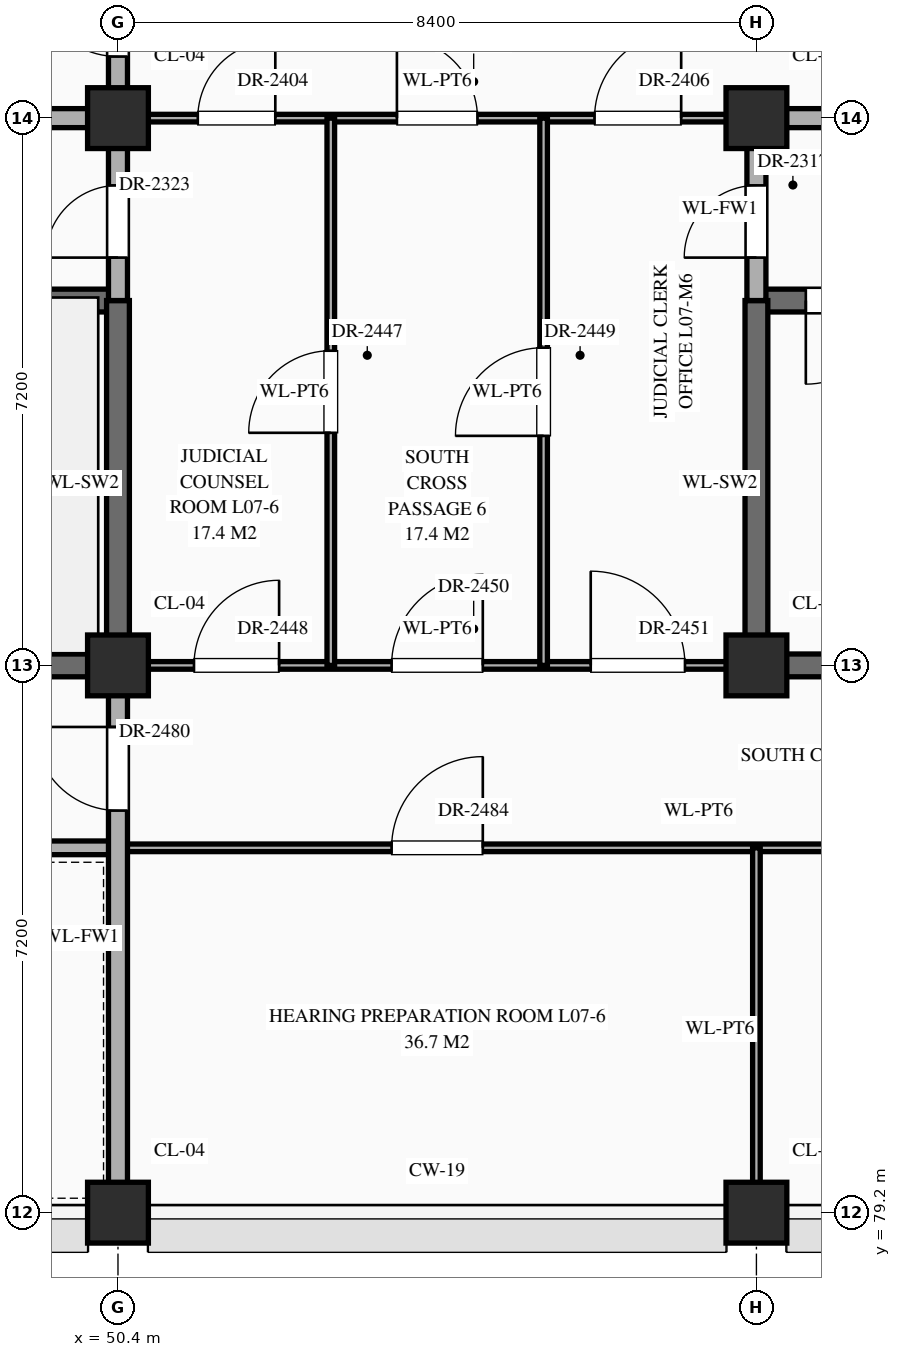
"""IFC4 building model, lengths in metres.
Left out: names, types, materials, properties, quantities, classifications, styles, units other than length and angle.
Written with IfcOpenShell. Run it as: python <this file> out.ifc"""

import sys

from ifc_helpers import new_model, si_unit, direction, frame, frame_2d, origin, origin_2d, place, context, subcontext, project, spatial, rectangle, extrude, element, fill, save


model = new_model("IFC4")
c1 = context("Model", 3, precision=1e-05, world=origin(), true_north=direction((0.0, 1.0)))
c2 = subcontext(c1, "Body", "Model", "MODEL_VIEW")
j1 = project(units=[si_unit("LENGTHUNIT", "METRE"), si_unit("PLANEANGLEUNIT", "RADIAN")], contexts=[c1])
p1 = place(None, origin())
s1 = spatial("IfcSite", under=j1, at=p1, CompositionType="ELEMENT")
p2 = place(p1, origin())
s2 = spatial("IfcBuilding", under=s1, at=p2, CompositionType="ELEMENT")
p3 = place(p2, frame((0.0, 0.0, 30.6)))
s3 = spatial("IfcBuildingStorey", under=s2, at=p3, CompositionType="ELEMENT", Elevation=30.6)
for number, where, z_axis, x_axis in (
    (1, (50.4, 79.2, 0.0), (0.0, 0.0, 1.0), (1.0, 0.0, 0.0)),
    (2, (50.4, 86.4, 0.0), (0.0, 0.0, 1.0), (1.0, 0.0, 0.0)),
    (3, (50.4, 93.6, 0.0), (0.0, 0.0, 1.0), (1.0, 0.0, 0.0)),
    (4, (58.8, 79.2, 0.0), (0.0, 0.0, 1.0), (1.0, 0.0, 0.0)),
    (5, (58.8, 86.4, 0.0), (0.0, 0.0, 1.0), (1.0, 0.0, 0.0)),
    (6, (58.8, 93.6, 0.0), (0.0, 0.0, 1.0), (1.0, 0.0, 0.0)),
):
    element("IfcColumn", number, at=place(p3, frame(where, z_axis=z_axis, x_axis=x_axis)), inside=s3, PredefinedType="COLUMN", context=c2, shape_type="SweptSolid", body=[
        extrude(rectangle(XDim=0.8, YDim=0.8, at=origin_2d()), origin(), (0.0, 0.0, 1.0), 4.5),
    ])
p4 = place(p3, frame((33.6, 84.0, 0.0), z_axis=(0.0, 0.0, 1.0), x_axis=(1.0, 0.0, 0.0)))
e7 = element("IfcWall", 7, at=p4, inside=s3, PredefinedType="STANDARD", context=c2, shape_type="SweptSolid", body=[
    extrude(rectangle(XDim=16.8, YDim=0.18, at=frame_2d((8.4, 0.0))), origin(), (0.0, 0.0, 1.0), 4.15),
])
p5 = place(p4, frame((7.45, 0.0, 0.0)))
e8 = element("IfcOpeningElement", 8, at=p5, cuts=e7, PredefinedType="OPENING", context=c2, shape_type="SweptSolid", body=[
    extrude(rectangle(XDim=1.9, YDim=2.5, at=frame_2d((0.95, 1.25))), frame((0.0, 0.102, 0.0), z_axis=(0.0, -1.0, 0.0), x_axis=(1.0, 0.0, 0.0)), (0.0, 0.0, 1.0), 0.204),
])
p6 = place(p3, frame((50.4, 84.0, 0.0), z_axis=(0.0, 0.0, 1.0), x_axis=(1.0, 0.0, 0.0)))
e9 = element("IfcWall", 9, at=p6, inside=s3, PredefinedType="STANDARD", context=c2, shape_type="SweptSolid", body=[
    extrude(rectangle(XDim=16.8, YDim=0.1, at=frame_2d((8.4, 0.0))), origin(), (0.0, 0.0, 1.0), 4.24),
])
p7 = place(p6, frame((3.6, 0.0, 0.0)))
e10 = element("IfcOpeningElement", 10, at=p7, cuts=e9, PredefinedType="OPENING", context=c2, shape_type="SweptSolid", body=[
    extrude(rectangle(XDim=1.2, YDim=2.35, at=frame_2d((0.6, 1.175))), frame((0.0, 0.062, 0.0), z_axis=(0.0, -1.0, 0.0), x_axis=(1.0, 0.0, 0.0)), (0.0, 0.0, 1.0), 0.124),
])
p8 = place(p6, frame((11.98, 0.0, 0.0)))
e11 = element("IfcOpeningElement", 11, at=p8, cuts=e9, PredefinedType="OPENING", context=c2, shape_type="SweptSolid", body=[
    extrude(rectangle(XDim=1.24, YDim=2.3, at=frame_2d((0.62, 1.15))), frame((0.0, 0.062, 0.0), z_axis=(0.0, -1.0, 0.0), x_axis=(1.0, 0.0, 0.0)), (0.0, 0.0, 1.0), 0.124),
])
p9 = place(p3, frame((42.0, 86.4, 0.0), z_axis=(0.0, 0.0, 1.0), x_axis=(1.0, 0.0, 0.0)))
e12 = element("IfcWall", 12, at=p9, inside=s3, PredefinedType="SHEAR", context=c2, shape_type="SweptSolid", body=[
    extrude(rectangle(XDim=8.4, YDim=0.3, at=frame_2d((4.2, 0.0))), origin(), (0.0, 0.0, 1.0), 4.24),
])
p10 = place(p3, frame((50.4, 86.4, 0.0), z_axis=(0.0, 0.0, 1.0), x_axis=(1.0, 0.0, 0.0)))
e13 = element("IfcWall", 13, at=p10, inside=s3, PredefinedType="STANDARD", context=c2, shape_type="SweptSolid", body=[
    extrude(rectangle(XDim=8.4, YDim=0.1, at=frame_2d((4.2, 0.0))), origin(), (0.0, 0.0, 1.0), 3.39),
])
p11 = place(p10, frame((1.0, 0.0, 0.0)))
e14 = element("IfcOpeningElement", 14, at=p11, cuts=e13, PredefinedType="OPENING", context=c2, shape_type="SweptSolid", body=[
    extrude(rectangle(XDim=1.12, YDim=2.25, at=frame_2d((0.56, 1.125))), frame((0.0, 0.062, 0.0), z_axis=(0.0, -1.0, 0.0), x_axis=(1.0, 0.0, 0.0)), (0.0, 0.0, 1.0), 0.124),
])
p12 = place(p10, frame((3.6, 0.0, 0.0)))
e15 = element("IfcOpeningElement", 15, at=p12, cuts=e13, PredefinedType="OPENING", context=c2, shape_type="SweptSolid", body=[
    extrude(rectangle(XDim=1.2, YDim=2.35, at=frame_2d((0.6, 1.175))), frame((0.0, 0.062, 0.0), z_axis=(0.0, -1.0, 0.0), x_axis=(1.0, 0.0, 0.0)), (0.0, 0.0, 1.0), 0.124),
])
p13 = place(p10, frame((6.22, 0.0, 0.0)))
e16 = element("IfcOpeningElement", 16, at=p13, cuts=e13, PredefinedType="OPENING", context=c2, shape_type="SweptSolid", body=[
    extrude(rectangle(XDim=1.24, YDim=2.3, at=frame_2d((0.62, 1.15))), frame((0.0, 0.062, 0.0), z_axis=(0.0, -1.0, 0.0), x_axis=(1.0, 0.0, 0.0)), (0.0, 0.0, 1.0), 0.124),
])
p14 = place(p3, frame((58.8, 86.4, 0.0), z_axis=(0.0, 0.0, 1.0), x_axis=(1.0, 0.0, 0.0)))
e17 = element("IfcWall", 17, at=p14, inside=s3, PredefinedType="SHEAR", context=c2, shape_type="SweptSolid", body=[
    extrude(rectangle(XDim=8.4, YDim=0.3, at=frame_2d((4.2, 0.0))), origin(), (0.0, 0.0, 1.0), 4.24),
])
p15 = place(p3, frame((42.0, 91.2, 0.0), z_axis=(0.0, 0.0, 1.0), x_axis=(1.0, 0.0, 0.0)))
e18 = element("IfcWall", 18, at=p15, inside=s3, PredefinedType="SHEAR", context=c2, shape_type="SweptSolid", body=[
    extrude(rectangle(XDim=8.4, YDim=0.3, at=frame_2d((4.2, 0.0))), origin(), (0.0, 0.0, 1.0), 4.24),
])
p16 = place(p15, frame((0.65, 0.0, 0.0)))
e19 = element("IfcOpeningElement", 19, at=p16, cuts=e18, PredefinedType="OPENING", context=c2, shape_type="SweptSolid", body=[
    extrude(rectangle(XDim=1.1, YDim=2.2, at=frame_2d((0.55, 1.1))), frame((0.0, 0.162, 0.0), z_axis=(0.0, -1.0, 0.0), x_axis=(1.0, 0.0, 0.0)), (0.0, 0.0, 1.0), 0.324),
])
p17 = place(p3, frame((58.8, 91.2, 0.0), z_axis=(0.0, 0.0, 1.0), x_axis=(1.0, 0.0, 0.0)))
e20 = element("IfcWall", 20, at=p17, inside=s3, PredefinedType="SHEAR", context=c2, shape_type="SweptSolid", body=[
    extrude(rectangle(XDim=8.4, YDim=0.3, at=frame_2d((4.2, 0.0))), origin(), (0.0, 0.0, 1.0), 4.24),
])
p18 = place(p17, frame((0.65, 0.0, 0.0)))
e21 = element("IfcOpeningElement", 21, at=p18, cuts=e20, PredefinedType="OPENING", context=c2, shape_type="SweptSolid", body=[
    extrude(rectangle(XDim=1.1, YDim=2.2, at=frame_2d((0.55, 1.1))), frame((0.0, 0.162, 0.0), z_axis=(0.0, -1.0, 0.0), x_axis=(1.0, 0.0, 0.0)), (0.0, 0.0, 1.0), 0.324),
])
p19 = place(p3, frame((42.0, 93.6, 0.0), z_axis=(0.0, 0.0, 1.0), x_axis=(1.0, 0.0, 0.0)))
e22 = element("IfcWall", 22, at=p19, inside=s3, PredefinedType="STANDARD", context=c2, shape_type="SweptSolid", body=[
    extrude(rectangle(XDim=8.4, YDim=0.25, at=frame_2d((4.2, 0.0))), origin(), (0.0, 0.0, 1.0), 3.39),
])
p20 = place(p19, frame((3.4, 0.0, 0.0)))
e23 = element("IfcOpeningElement", 23, at=p20, cuts=e22, PredefinedType="OPENING", context=c2, shape_type="SweptSolid", body=[
    extrude(rectangle(XDim=1.6, YDim=2.3, at=frame_2d((0.8, 1.15))), frame((0.0, 0.137, 0.0), z_axis=(0.0, -1.0, 0.0), x_axis=(1.0, 0.0, 0.0)), (0.0, 0.0, 1.0), 0.274),
])
p21 = place(p3, frame((50.4, 93.6, 0.0), z_axis=(0.0, 0.0, 1.0), x_axis=(1.0, 0.0, 0.0)))
e24 = element("IfcWall", 24, at=p21, inside=s3, PredefinedType="STANDARD", context=c2, shape_type="SweptSolid", body=[
    extrude(rectangle(XDim=8.4, YDim=0.1, at=frame_2d((4.2, 0.0))), origin(), (0.0, 0.0, 1.0), 3.39),
])
p22 = place(p21, frame((1.05, 0.0, 0.0)))
e25 = element("IfcOpeningElement", 25, at=p22, cuts=e24, PredefinedType="OPENING", context=c2, shape_type="SweptSolid", body=[
    extrude(rectangle(XDim=1.02, YDim=2.4, at=frame_2d((0.51, 1.2))), frame((0.0, 0.062, 0.0), z_axis=(0.0, -1.0, 0.0), x_axis=(1.0, 0.0, 0.0)), (0.0, 0.0, 1.0), 0.124),
])
p23 = place(p21, frame((3.67, 0.0, 0.0)))
e26 = element("IfcOpeningElement", 26, at=p23, cuts=e24, PredefinedType="OPENING", context=c2, shape_type="SweptSolid", body=[
    extrude(rectangle(XDim=1.06, YDim=2.4, at=frame_2d((0.53, 1.2))), frame((0.0, 0.062, 0.0), z_axis=(0.0, -1.0, 0.0), x_axis=(1.0, 0.0, 0.0)), (0.0, 0.0, 1.0), 0.124),
])
p24 = place(p21, frame((6.27, 0.0, 0.0)))
e27 = element("IfcOpeningElement", 27, at=p24, cuts=e24, PredefinedType="OPENING", context=c2, shape_type="SweptSolid", body=[
    extrude(rectangle(XDim=1.14, YDim=2.4, at=frame_2d((0.57, 1.2))), frame((0.0, 0.062, 0.0), z_axis=(0.0, -1.0, 0.0), x_axis=(1.0, 0.0, 0.0)), (0.0, 0.0, 1.0), 0.124),
])
p25 = place(p3, frame((58.8, 93.6, 0.0), z_axis=(0.0, 0.0, 1.0), x_axis=(1.0, 0.0, 0.0)))
e28 = element("IfcWall", 28, at=p25, inside=s3, PredefinedType="STANDARD", context=c2, shape_type="SweptSolid", body=[
    extrude(rectangle(XDim=8.4, YDim=0.25, at=frame_2d((4.2, 0.0))), origin(), (0.0, 0.0, 1.0), 3.39),
])
p26 = place(p25, frame((3.2, 0.0, 0.0)))
e29 = element("IfcOpeningElement", 29, at=p26, cuts=e28, PredefinedType="OPENING", context=c2, shape_type="SweptSolid", body=[
    extrude(rectangle(XDim=2.0, YDim=2.4, at=frame_2d((1.0, 1.2))), frame((0.0, 0.137, 0.0), z_axis=(0.0, -1.0, 0.0), x_axis=(1.0, 0.0, 0.0)), (0.0, 0.0, 1.0), 0.274),
])
p27 = place(p3, frame((50.4, 79.24, 0.0), z_axis=(0.0, 0.0, 1.0), x_axis=(0.0, 1.0, 0.0)))
e30 = element("IfcWall", 30, at=p27, inside=s3, PredefinedType="STANDARD", context=c2, shape_type="SweptSolid", body=[
    extrude(rectangle(XDim=7.16, YDim=0.25, at=frame_2d((3.58, 0.0))), origin(), (0.0, 0.0, 1.0), 3.49),
])
p28 = place(p27, frame((5.25, 0.0, 0.0)))
e31 = element("IfcOpeningElement", 31, at=p28, cuts=e30, PredefinedType="OPENING", context=c2, shape_type="SweptSolid", body=[
    extrude(rectangle(XDim=1.1, YDim=2.2, at=frame_2d((0.55, 1.1))), frame((0.0, 0.137, 0.0), z_axis=(0.0, -1.0, 0.0), x_axis=(1.0, 0.0, 0.0)), (0.0, 0.0, 1.0), 0.274),
])
p29 = place(p3, frame((50.4, 86.4, 0.0), z_axis=(0.0, 0.0, 1.0), x_axis=(0.0, 1.0, 0.0)))
e32 = element("IfcWall", 32, at=p29, inside=s3, PredefinedType="SHEAR", context=c2, shape_type="SweptSolid", body=[
    extrude(rectangle(XDim=4.8, YDim=0.3, at=frame_2d((2.4, 0.0))), origin(), (0.0, 0.0, 1.0), 4.24),
])
p30 = place(p3, frame((50.4, 91.2, 0.0), z_axis=(0.0, 0.0, 1.0), x_axis=(0.0, 1.0, 0.0)))
e33 = element("IfcWall", 33, at=p30, inside=s3, PredefinedType="STANDARD", context=c2, shape_type="SweptSolid", body=[
    extrude(rectangle(XDim=13.2, YDim=0.25, at=frame_2d((6.6, 0.0))), origin(), (0.0, 0.0, 1.0), 3.49),
])
p31 = place(p30, frame((0.565, 0.0, 0.0)))
e34 = element("IfcOpeningElement", 34, at=p31, cuts=e33, PredefinedType="OPENING", context=c2, shape_type="SweptSolid", body=[
    extrude(rectangle(XDim=0.95, YDim=2.15, at=frame_2d((0.475, 1.075))), frame((0.0, 0.137, 0.0), z_axis=(0.0, -1.0, 0.0), x_axis=(1.0, 0.0, 0.0)), (0.0, 0.0, 1.0), 0.274),
])
p32 = place(p30, frame((10.46, 0.0, 0.0)))
e35 = element("IfcOpeningElement", 35, at=p32, cuts=e33, PredefinedType="OPENING", context=c2, shape_type="SweptSolid", body=[
    extrude(rectangle(XDim=1.0, YDim=2.2, at=frame_2d((0.5, 1.1))), frame((0.0, 0.137, 0.0), z_axis=(0.0, -1.0, 0.0), x_axis=(1.0, 0.0, 0.0)), (0.0, 0.0, 1.0), 0.274),
])
p33 = place(p30, frame((3.21, 0.0, 0.0)))
e36 = element("IfcOpeningElement", 36, at=p33, cuts=e33, PredefinedType="OPENING", context=c2, shape_type="SweptSolid", body=[
    extrude(rectangle(XDim=1.1, YDim=2.2, at=frame_2d((0.55, 1.1))), frame((0.0, 0.137, 0.0), z_axis=(0.0, -1.0, 0.0), x_axis=(1.0, 0.0, 0.0)), (0.0, 0.0, 1.0), 0.274),
])
p34 = place(p3, frame((53.2, 86.4, 0.0), z_axis=(0.0, 0.0, 1.0), x_axis=(0.0, 1.0, 0.0)))
e37 = element("IfcWall", 37, at=p34, inside=s3, PredefinedType="STANDARD", context=c2, shape_type="SweptSolid", body=[
    extrude(rectangle(XDim=7.2, YDim=0.1, at=frame_2d((3.6, 0.0))), origin(), (0.0, 0.0, 1.0), 4.24),
])
p35 = place(p34, frame((3.06, 0.0, 0.0)))
e38 = element("IfcOpeningElement", 38, at=p35, cuts=e37, PredefinedType="OPENING", context=c2, shape_type="SweptSolid", body=[
    extrude(rectangle(XDim=1.08, YDim=2.25, at=frame_2d((0.54, 1.125))), frame((0.0, 0.062, 0.0), z_axis=(0.0, -1.0, 0.0), x_axis=(1.0, 0.0, 0.0)), (0.0, 0.0, 1.0), 0.124),
])
p36 = place(p3, frame((56.0, 86.4, 0.0), z_axis=(0.0, 0.0, 1.0), x_axis=(0.0, 1.0, 0.0)))
e39 = element("IfcWall", 39, at=p36, inside=s3, PredefinedType="STANDARD", context=c2, shape_type="SweptSolid", body=[
    extrude(rectangle(XDim=7.2, YDim=0.1, at=frame_2d((3.6, 0.0))), origin(), (0.0, 0.0, 1.0), 4.24),
])
p37 = place(p36, frame((3.02, 0.0, 0.0)))
e40 = element("IfcOpeningElement", 40, at=p37, cuts=e39, PredefinedType="OPENING", context=c2, shape_type="SweptSolid", body=[
    extrude(rectangle(XDim=1.16, YDim=2.3, at=frame_2d((0.58, 1.15))), frame((0.0, 0.062, 0.0), z_axis=(0.0, -1.0, 0.0), x_axis=(1.0, 0.0, 0.0)), (0.0, 0.0, 1.0), 0.124),
])
p38 = place(p3, frame((58.8, 79.24, 0.0), z_axis=(0.0, 0.0, 1.0), x_axis=(0.0, 1.0, 0.0)))
e41 = element("IfcWall", 41, at=p38, inside=s3, PredefinedType="STANDARD", context=c2, shape_type="SweptSolid", body=[
    extrude(rectangle(XDim=4.76, YDim=0.1, at=frame_2d((2.38, 0.0))), origin(), (0.0, 0.0, 1.0), 3.49),
])
p39 = place(p3, frame((58.8, 86.4, 0.0), z_axis=(0.0, 0.0, 1.0), x_axis=(0.0, 1.0, 0.0)))
e42 = element("IfcWall", 42, at=p39, inside=s3, PredefinedType="SHEAR", context=c2, shape_type="SweptSolid", body=[
    extrude(rectangle(XDim=4.8, YDim=0.3, at=frame_2d((2.4, 0.0))), origin(), (0.0, 0.0, 1.0), 4.24),
])
p40 = place(p3, frame((58.8, 91.2, 0.0), z_axis=(0.0, 0.0, 1.0), x_axis=(0.0, 1.0, 0.0)))
e43 = element("IfcWall", 43, at=p40, inside=s3, PredefinedType="STANDARD", context=c2, shape_type="SweptSolid", body=[
    extrude(rectangle(XDim=2.4, YDim=0.25, at=frame_2d((1.2, 0.0))), origin(), (0.0, 0.0, 1.0), 3.49),
])
p41 = place(p40, frame((0.565, 0.0, 0.0)))
e44 = element("IfcOpeningElement", 44, at=p41, cuts=e43, PredefinedType="OPENING", context=c2, shape_type="SweptSolid", body=[
    extrude(rectangle(XDim=0.95, YDim=2.15, at=frame_2d((0.475, 1.075))), frame((0.0, 0.137, 0.0), z_axis=(0.0, -1.0, 0.0), x_axis=(1.0, 0.0, 0.0)), (0.0, 0.0, 1.0), 0.274),
])
p42 = place(p18, frame((1.1, 0.0, 0.0), z_axis=(0.0, 0.0, 1.0), x_axis=(-1.0, 0.0, 0.0)))
e45 = element("IfcDoor", 45, at=p42, inside=s3, OperationType="SINGLE_SWING_RIGHT", PredefinedType="DOOR", context=c2, shape_type="SweptSolid", body=[
    extrude(rectangle(XDim=1.1, YDim=2.2, at=frame_2d((0.55, 1.1))), frame((0.0, 0.025, 0.0), z_axis=(0.0, -1.0, 0.0), x_axis=(1.0, 0.0, 0.0)), (0.0, 0.0, 1.0), 0.05),
])
fill(e21, e45)
p43 = place(p41, origin())
e46 = element("IfcDoor", 46, at=p43, inside=s3, OperationType="SINGLE_SWING_LEFT", PredefinedType="DOOR", context=c2, shape_type="SweptSolid", body=[
    extrude(rectangle(XDim=0.95, YDim=2.15, at=frame_2d((0.475, 1.075))), frame((0.0, 0.025, 0.0), z_axis=(0.0, -1.0, 0.0), x_axis=(1.0, 0.0, 0.0)), (0.0, 0.0, 1.0), 0.05),
])
fill(e44, e46)
p44 = place(p31, origin())
e47 = element("IfcDoor", 47, at=p44, inside=s3, OperationType="SINGLE_SWING_LEFT", PredefinedType="DOOR", context=c2, shape_type="SweptSolid", body=[
    extrude(rectangle(XDim=0.95, YDim=2.15, at=frame_2d((0.475, 1.075))), frame((0.0, 0.025, 0.0), z_axis=(0.0, -1.0, 0.0), x_axis=(1.0, 0.0, 0.0)), (0.0, 0.0, 1.0), 0.05),
])
fill(e34, e47)
p45 = place(p33, origin())
e48 = element("IfcDoor", 48, at=p45, inside=s3, OperationType="SINGLE_SWING_RIGHT", PredefinedType="DOOR", context=c2, shape_type="SweptSolid", body=[
    extrude(rectangle(XDim=1.1, YDim=2.2, at=frame_2d((0.55, 1.1))), frame((0.0, 0.025, 0.0), z_axis=(0.0, -1.0, 0.0), x_axis=(1.0, 0.0, 0.0)), (0.0, 0.0, 1.0), 0.05),
])
fill(e36, e48)
p46 = place(p22, origin())
e49 = element("IfcDoor", 49, at=p46, inside=s3, OperationType="SINGLE_SWING_RIGHT", PredefinedType="DOOR", context=c2, shape_type="SweptSolid", body=[
    extrude(rectangle(XDim=1.02, YDim=2.4, at=frame_2d((0.51, 1.2))), frame((0.0, 0.025, 0.0), z_axis=(0.0, -1.0, 0.0), x_axis=(1.0, 0.0, 0.0)), (0.0, 0.0, 1.0), 0.05),
])
fill(e25, e49)
p47 = place(p23, origin())
e50 = element("IfcDoor", 50, at=p47, inside=s3, OperationType="SINGLE_SWING_LEFT", PredefinedType="DOOR", context=c2, shape_type="SweptSolid", body=[
    extrude(rectangle(XDim=1.06, YDim=2.4, at=frame_2d((0.53, 1.2))), frame((0.0, 0.025, 0.0), z_axis=(0.0, -1.0, 0.0), x_axis=(1.0, 0.0, 0.0)), (0.0, 0.0, 1.0), 0.05),
])
fill(e26, e50)
p48 = place(p24, origin())
e51 = element("IfcDoor", 51, at=p48, inside=s3, OperationType="SINGLE_SWING_RIGHT", PredefinedType="DOOR", context=c2, shape_type="SweptSolid", body=[
    extrude(rectangle(XDim=1.14, YDim=2.4, at=frame_2d((0.57, 1.2))), frame((0.0, 0.025, 0.0), z_axis=(0.0, -1.0, 0.0), x_axis=(1.0, 0.0, 0.0)), (0.0, 0.0, 1.0), 0.05),
])
fill(e27, e51)
p49 = place(p35, origin())
e52 = element("IfcDoor", 52, at=p49, inside=s3, OperationType="SINGLE_SWING_LEFT", PredefinedType="DOOR", context=c2, shape_type="SweptSolid", body=[
    extrude(rectangle(XDim=1.08, YDim=2.25, at=frame_2d((0.54, 1.125))), frame((0.0, 0.025, 0.0), z_axis=(0.0, -1.0, 0.0), x_axis=(1.0, 0.0, 0.0)), (0.0, 0.0, 1.0), 0.05),
])
fill(e38, e52)
p50 = place(p11, origin())
e53 = element("IfcDoor", 53, at=p50, inside=s3, OperationType="SINGLE_SWING_RIGHT", PredefinedType="DOOR", context=c2, shape_type="SweptSolid", body=[
    extrude(rectangle(XDim=1.12, YDim=2.25, at=frame_2d((0.56, 1.125))), frame((0.0, 0.025, 0.0), z_axis=(0.0, -1.0, 0.0), x_axis=(1.0, 0.0, 0.0)), (0.0, 0.0, 1.0), 0.05),
])
fill(e14, e53)
p51 = place(p37, origin())
e54 = element("IfcDoor", 54, at=p51, inside=s3, OperationType="SINGLE_SWING_LEFT", PredefinedType="DOOR", context=c2, shape_type="SweptSolid", body=[
    extrude(rectangle(XDim=1.16, YDim=2.3, at=frame_2d((0.58, 1.15))), frame((0.0, 0.025, 0.0), z_axis=(0.0, -1.0, 0.0), x_axis=(1.0, 0.0, 0.0)), (0.0, 0.0, 1.0), 0.05),
])
fill(e40, e54)
p52 = place(p12, origin())
e55 = element("IfcDoor", 55, at=p52, inside=s3, OperationType="SINGLE_SWING_RIGHT", PredefinedType="DOOR", context=c2, shape_type="SweptSolid", body=[
    extrude(rectangle(XDim=1.2, YDim=2.35, at=frame_2d((0.6, 1.175))), frame((0.0, 0.025, 0.0), z_axis=(0.0, -1.0, 0.0), x_axis=(1.0, 0.0, 0.0)), (0.0, 0.0, 1.0), 0.05),
])
fill(e15, e55)
p53 = place(p13, origin())
e56 = element("IfcDoor", 56, at=p53, inside=s3, OperationType="SINGLE_SWING_LEFT", PredefinedType="DOOR", context=c2, shape_type="SweptSolid", body=[
    extrude(rectangle(XDim=1.24, YDim=2.3, at=frame_2d((0.62, 1.15))), frame((0.0, 0.025, 0.0), z_axis=(0.0, -1.0, 0.0), x_axis=(1.0, 0.0, 0.0)), (0.0, 0.0, 1.0), 0.05),
])
fill(e16, e56)
p54 = place(p28, origin())
e57 = element("IfcDoor", 57, at=p54, inside=s3, OperationType="SINGLE_SWING_RIGHT", PredefinedType="DOOR", context=c2, shape_type="SweptSolid", body=[
    extrude(rectangle(XDim=1.1, YDim=2.2, at=frame_2d((0.55, 1.1))), frame((0.0, 0.025, 0.0), z_axis=(0.0, -1.0, 0.0), x_axis=(1.0, 0.0, 0.0)), (0.0, 0.0, 1.0), 0.05),
])
fill(e31, e57)
p55 = place(p7, origin())
e58 = element("IfcDoor", 58, at=p55, inside=s3, OperationType="SINGLE_SWING_RIGHT", PredefinedType="DOOR", context=c2, shape_type="SweptSolid", body=[
    extrude(rectangle(XDim=1.2, YDim=2.35, at=frame_2d((0.6, 1.175))), frame((0.0, 0.025, 0.0), z_axis=(0.0, -1.0, 0.0), x_axis=(1.0, 0.0, 0.0)), (0.0, 0.0, 1.0), 0.05),
])
fill(e10, e58)
save(model, sys.argv[1])
